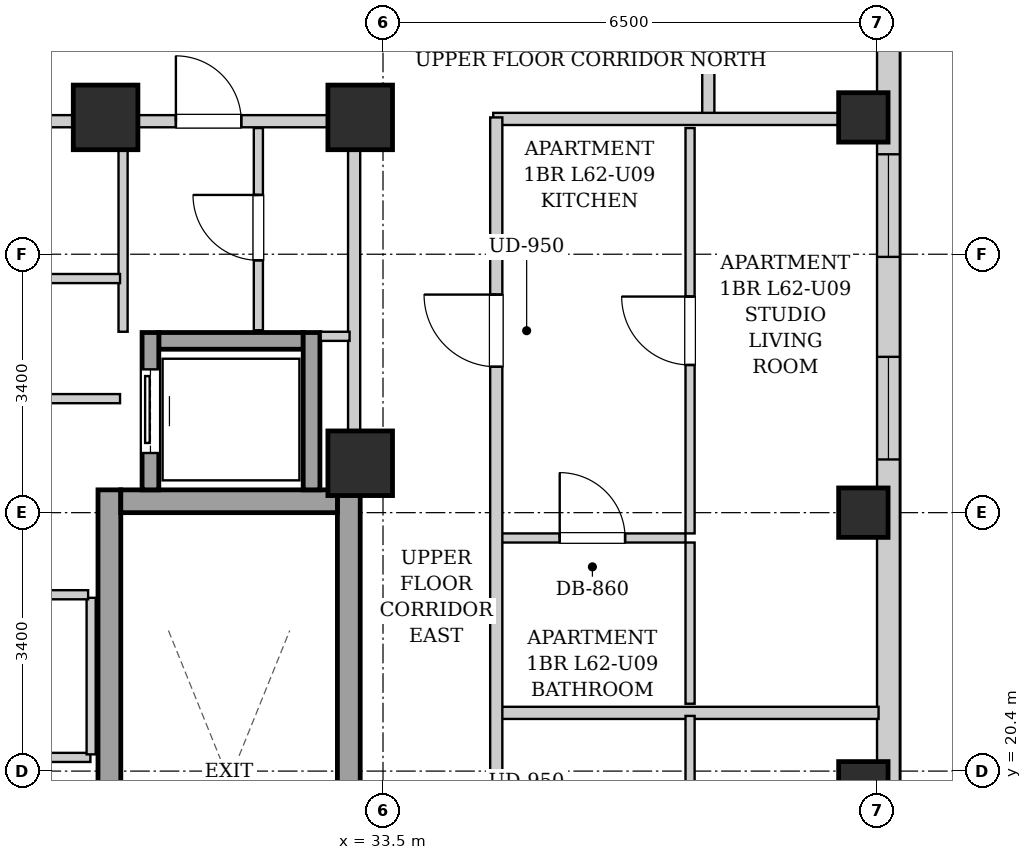
"""IFC4 building model, lengths in metres.
Left out: names, types, materials, properties, quantities, classifications, styles, units other than length and angle.
Written with IfcOpenShell. Run it as: python <this file> out.ifc"""

import sys

from ifc_helpers import new_model, si_unit, direction, frame, frame_2d, origin, origin_2d, place, context, subcontext, project, spatial, rectangle, extrude, element, fill, save


model = new_model("IFC4")
c1 = context("Model", 3, precision=1e-05, world=origin(), true_north=direction((0.0, 1.0)))
c2 = subcontext(c1, "Body", "Model", "MODEL_VIEW")
j1 = project(units=[si_unit("LENGTHUNIT", "METRE"), si_unit("PLANEANGLEUNIT", "RADIAN")], contexts=[c1])
p1 = place(None, origin())
s1 = spatial("IfcSite", under=j1, at=p1, CompositionType="ELEMENT")
p2 = place(p1, origin())
s2 = spatial("IfcBuilding", under=s1, at=p2, CompositionType="ELEMENT")
p3 = place(p2, frame((0.0, 0.0, 214.0)))
s3 = spatial("IfcBuildingStorey", under=s2, at=p3, CompositionType="ELEMENT", Elevation=214.0)
for number, where, z_axis, x_axis in (
    (1, (39.82, 20.2, 0.0), (0.0, 0.0, 1.0), (1.0, 0.0, 0.0)),
    (2, (39.82, 23.8, 0.0), (0.0, 0.0, 1.0), (1.0, 0.0, 0.0)),
    (3, (39.82, 29.0, 0.0), (0.0, 0.0, 1.0), (1.0, 0.0, 0.0)),
):
    element("IfcColumn", number, at=place(p3, frame(where, z_axis=z_axis, x_axis=x_axis)), inside=s3, PredefinedType="COLUMN", context=c2, shape_type="SweptSolid", body=[
        extrude(rectangle(XDim=0.65, YDim=0.65, at=origin_2d()), origin(), (0.0, 0.0, 1.0), 3.3),
    ])
for number, where, z_axis, x_axis in (
    (4, (29.85, 29.0, 0.0), (0.0, 0.0, 1.0), (1.0, 0.0, 0.0)),
    (5, (33.2, 29.0, 0.0), (0.0, 0.0, 1.0), (1.0, 0.0, 0.0)),
    (6, (33.2, 24.45, 0.0), (0.0, 0.0, 1.0), (1.0, 0.0, 0.0)),
):
    element("IfcColumn", number, at=place(p3, frame(where, z_axis=z_axis, x_axis=x_axis)), inside=s3, PredefinedType="COLUMN", context=c2, shape_type="SweptSolid", body=[
        extrude(rectangle(XDim=0.85, YDim=0.85, at=origin_2d()), origin(), (0.0, 0.0, 1.0), 3.3),
    ])
p4 = place(p3, frame((40.15, 37.7, 0.0), z_axis=(0.0, 0.0, 1.0), x_axis=(0.0, -1.0, 0.0)))
e7 = element("IfcWall", 7, at=p4, inside=s3, PredefinedType="SOLIDWALL", context=c2, shape_type="SweptSolid", body=[
    extrude(rectangle(XDim=31.4, YDim=0.3, at=frame_2d((15.7, 0.0))), origin(), (0.0, 0.0, 1.0), 3.04),
])
p5 = place(p4, frame((28.396, 0.0, 0.55)))
e8 = element("IfcOpeningElement", 8, at=p5, cuts=e7, PredefinedType="OPENING", context=c2, shape_type="SweptSolid", body=[
    extrude(rectangle(XDim=1.35, YDim=1.2, at=frame_2d((0.675, 0.6))), frame((0.0, 0.16, 0.0), z_axis=(0.0, -1.0, 0.0), x_axis=(1.0, 0.0, 0.0)), (0.0, 0.0, 1.0), 0.32),
])
p6 = place(p4, frame((1.653, 0.0, 0.55)))
e9 = element("IfcOpeningElement", 9, at=p6, cuts=e7, PredefinedType="OPENING", context=c2, shape_type="SweptSolid", body=[
    extrude(rectangle(XDim=1.35, YDim=1.2, at=frame_2d((0.675, 0.6))), frame((0.0, 0.16, 0.0), z_axis=(0.0, -1.0, 0.0), x_axis=(1.0, 0.0, 0.0)), (0.0, 0.0, 1.0), 0.32),
])
p7 = place(p4, frame((18.856, 0.0, 0.55)))
e10 = element("IfcOpeningElement", 10, at=p7, cuts=e7, PredefinedType="OPENING", context=c2, shape_type="SweptSolid", body=[
    extrude(rectangle(XDim=1.35, YDim=1.2, at=frame_2d((0.675, 0.6))), frame((0.0, 0.16, 0.0), z_axis=(0.0, -1.0, 0.0), x_axis=(1.0, 0.0, 0.0)), (0.0, 0.0, 1.0), 0.32),
])
p8 = place(p4, frame((20.466, 0.0, 0.55)))
e11 = element("IfcOpeningElement", 11, at=p8, cuts=e7, PredefinedType="OPENING", context=c2, shape_type="SweptSolid", body=[
    extrude(rectangle(XDim=1.35, YDim=1.2, at=frame_2d((0.675, 0.6))), frame((0.0, 0.16, 0.0), z_axis=(0.0, -1.0, 0.0), x_axis=(1.0, 0.0, 0.0)), (0.0, 0.0, 1.0), 0.32),
])
p9 = place(p4, frame((11.85, 0.0, 0.55)))
e12 = element("IfcOpeningElement", 12, at=p9, cuts=e7, PredefinedType="OPENING", context=c2, shape_type="SweptSolid", body=[
    extrude(rectangle(XDim=1.35, YDim=1.2, at=frame_2d((0.675, 0.6))), frame((0.0, 0.16, 0.0), z_axis=(0.0, -1.0, 0.0), x_axis=(1.0, 0.0, 0.0)), (0.0, 0.0, 1.0), 0.32),
])
p10 = place(p4, frame((9.185, 0.0, 0.55)))
e13 = element("IfcOpeningElement", 13, at=p10, cuts=e7, PredefinedType="OPENING", context=c2, shape_type="SweptSolid", body=[
    extrude(rectangle(XDim=1.35, YDim=1.2, at=frame_2d((0.675, 0.6))), frame((0.0, 0.16, 0.0), z_axis=(0.0, -1.0, 0.0), x_axis=(1.0, 0.0, 0.0)), (0.0, 0.0, 1.0), 0.32),
])
for number, where, z_axis, x_axis in (
    (14, (29.9, 15.1, 0.0), (0.0, 0.0, 1.0), (0.0, 1.0, 0.0)),
    (15, (33.05, 15.1, 0.0), (0.0, 0.0, 1.0), (0.0, 1.0, 0.0)),
):
    element("IfcWall", number, at=place(p3, frame(where, z_axis=z_axis, x_axis=x_axis)), inside=s3, PredefinedType="SHEAR", context=c2, shape_type="SweptSolid", body=[
        extrude(rectangle(XDim=9.0, YDim=0.3, at=frame_2d((4.5, 0.0))), origin(), (0.0, 0.0, 1.0), 3.04),
    ])
p11 = place(p3, frame((30.05, 23.95, 0.0), z_axis=(0.0, 0.0, 1.0), x_axis=(1.0, 0.0, 0.0)))
e16 = element("IfcWall", 16, at=p11, inside=s3, PredefinedType="SHEAR", context=c2, shape_type="SweptSolid", body=[
    extrude(rectangle(XDim=2.85, YDim=0.3, at=frame_2d((1.425, 0.0))), origin(), (0.0, 0.0, 1.0), 3.04),
])
p12 = place(p3, frame((30.55, 26.06, 0.0), z_axis=(0.0, 0.0, 1.0), x_axis=(1.0, 0.0, 0.0)))
e17 = element("IfcWall", 17, at=p12, inside=s3, PredefinedType="SHEAR", context=c2, shape_type="SweptSolid", body=[
    extrude(rectangle(XDim=1.9, YDim=0.22, at=frame_2d((0.95, 0.0))), origin(), (0.0, 0.0, 1.0), 3.04),
])
p13 = place(p3, frame((30.44, 24.1, 0.0), z_axis=(0.0, 0.0, 1.0), x_axis=(0.0, 1.0, 0.0)))
e18 = element("IfcWall", 18, at=p13, inside=s3, PredefinedType="SHEAR", context=c2, shape_type="SweptSolid", body=[
    extrude(rectangle(XDim=2.07, YDim=0.22, at=frame_2d((1.035, 0.0))), origin(), (0.0, 0.0, 1.0), 3.04),
])
p14 = place(p13, frame((0.485, 0.0, 0.0)))
e19 = element("IfcOpeningElement", 19, at=p14, cuts=e18, PredefinedType="OPENING", context=c2, shape_type="SweptSolid", body=[
    extrude(rectangle(XDim=1.1, YDim=2.15, at=frame_2d((0.55, 1.075))), frame((0.0, 0.12, 0.0), z_axis=(0.0, -1.0, 0.0), x_axis=(1.0, 0.0, 0.0)), (0.0, 0.0, 1.0), 0.24),
])
p15 = place(p3, frame((32.56, 24.1, 0.0), z_axis=(0.0, 0.0, 1.0), x_axis=(0.0, 1.0, 0.0)))
e20 = element("IfcWall", 20, at=p15, inside=s3, PredefinedType="SHEAR", context=c2, shape_type="SweptSolid", body=[
    extrude(rectangle(XDim=2.07, YDim=0.22, at=frame_2d((1.035, 0.0))), origin(), (0.0, 0.0, 1.0), 3.04),
])
p16 = place(p3, frame((33.12, 24.12, 0.0), z_axis=(0.0, 0.0, 1.0), x_axis=(0.0, 1.0, 0.0)))
e21 = element("IfcWall", 21, at=p16, inside=s3, PredefinedType="PARTITIONING", context=c2, shape_type="SweptSolid", body=[
    extrude(rectangle(XDim=4.76, YDim=0.16, at=frame_2d((2.38, 0.0))), origin(), (0.0, 0.0, 1.0), 3.04),
])
p17 = place(p3, frame((30.08, 26.18, 0.0), z_axis=(0.0, 0.0, 1.0), x_axis=(0.0, 1.0, 0.0)))
e22 = element("IfcWall", 22, at=p17, inside=s3, PredefinedType="PARTITIONING", context=c2, shape_type="SweptSolid", body=[
    extrude(rectangle(XDim=2.68, YDim=0.12, at=frame_2d((1.34, 0.0))), origin(), (0.0, 0.0, 1.0), 3.04),
])
p18 = place(p3, frame((32.68, 26.12, 0.0), z_axis=(0.0, 0.0, 1.0), x_axis=(1.0, 0.0, 0.0)))
e23 = element("IfcWall", 23, at=p18, inside=s3, PredefinedType="PARTITIONING", context=c2, shape_type="SweptSolid", body=[
    extrude(rectangle(XDim=0.38, YDim=0.12, at=frame_2d((0.19, 0.0))), origin(), (0.0, 0.0, 1.0), 3.04),
])
p19 = place(p3, frame((31.86, 26.2, 0.0), z_axis=(0.0, 0.0, 1.0), x_axis=(0.0, 1.0, 0.0)))
e24 = element("IfcWall", 24, at=p19, inside=s3, PredefinedType="PARTITIONING", context=c2, shape_type="SweptSolid", body=[
    extrude(rectangle(XDim=2.66, YDim=0.12, at=frame_2d((1.33, 0.0))), origin(), (0.0, 0.0, 1.0), 3.04),
])
p20 = place(p19, frame((0.92, 0.0, 0.0)))
e25 = element("IfcOpeningElement", 25, at=p20, cuts=e24, PredefinedType="OPENING", context=c2, shape_type="SweptSolid", body=[
    extrude(rectangle(XDim=0.86, YDim=2.05, at=frame_2d((0.43, 1.025))), frame((0.0, 0.07, 0.0), z_axis=(0.0, -1.0, 0.0), x_axis=(1.0, 0.0, 0.0)), (0.0, 0.0, 1.0), 0.14),
])
p21 = place(p3, frame((30.08, 28.95, 0.0), z_axis=(0.0, 0.0, 1.0), x_axis=(1.0, 0.0, 0.0)))
e26 = element("IfcWall", 26, at=p21, inside=s3, PredefinedType="PARTITIONING", context=c2, shape_type="SweptSolid", body=[
    extrude(rectangle(XDim=2.96, YDim=0.16, at=frame_2d((1.48, 0.0))), origin(), (0.0, 0.0, 1.0), 3.04),
])
p22 = place(p21, frame((0.695, 0.0, 0.0)))
e27 = element("IfcOpeningElement", 27, at=p22, cuts=e26, PredefinedType="OPENING", context=c2, shape_type="SweptSolid", body=[
    extrude(rectangle(XDim=0.86, YDim=2.05, at=frame_2d((0.43, 1.025))), frame((0.0, 0.09, 0.0), z_axis=(0.0, -1.0, 0.0), x_axis=(1.0, 0.0, 0.0)), (0.0, 0.0, 1.0), 0.18),
])
p23 = place(p3, frame((25.72, 26.88, 0.0), z_axis=(0.0, 0.0, 1.0), x_axis=(1.0, 0.0, 0.0)))
e28 = element("IfcWall", 28, at=p23, inside=s3, PredefinedType="PARTITIONING", context=c2, shape_type="SweptSolid", body=[
    extrude(rectangle(XDim=4.32, YDim=0.12, at=frame_2d((2.16, 0.0))), origin(), (0.0, 0.0, 1.0), 3.04),
])
p24 = place(p3, frame((25.72, 25.3, 0.0), z_axis=(0.0, 0.0, 1.0), x_axis=(1.0, 0.0, 0.0)))
e29 = element("IfcWall", 29, at=p24, inside=s3, PredefinedType="PARTITIONING", context=c2, shape_type="SweptSolid", body=[
    extrude(rectangle(XDim=4.32, YDim=0.12, at=frame_2d((2.16, 0.0))), origin(), (0.0, 0.0, 1.0), 3.04),
])
p25 = place(p24, frame((1.65, 0.0, 0.0)))
e30 = element("IfcOpeningElement", 30, at=p25, cuts=e29, PredefinedType="OPENING", context=c2, shape_type="SweptSolid", body=[
    extrude(rectangle(XDim=0.9, YDim=2.05, at=frame_2d((0.45, 1.025))), frame((0.0, 0.07, 0.0), z_axis=(0.0, -1.0, 0.0), x_axis=(1.0, 0.0, 0.0)), (0.0, 0.0, 1.0), 0.14),
])
p26 = place(p3, frame((25.72, 28.95, 0.0), z_axis=(0.0, 0.0, 1.0), x_axis=(1.0, 0.0, 0.0)))
e31 = element("IfcWall", 31, at=p26, inside=s3, PredefinedType="PARTITIONING", context=c2, shape_type="SweptSolid", body=[
    extrude(rectangle(XDim=4.32, YDim=0.16, at=frame_2d((2.16, 0.0))), origin(), (0.0, 0.0, 1.0), 2.556),
])
p27 = place(p26, frame((1.27, 0.0, 0.0)))
e32 = element("IfcOpeningElement", 32, at=p27, cuts=e31, PredefinedType="OPENING", context=c2, shape_type="SweptSolid", body=[
    extrude(rectangle(XDim=0.86, YDim=2.05, at=frame_2d((0.43, 1.025))), frame((0.0, 0.09, 0.0), z_axis=(0.0, -1.0, 0.0), x_axis=(1.0, 0.0, 0.0)), (0.0, 0.0, 1.0), 0.18),
])
p28 = place(p3, frame((22.3, 20.58, 0.0), z_axis=(0.0, 0.0, 1.0), x_axis=(1.0, 0.0, 0.0)))
e33 = element("IfcWall", 33, at=p28, inside=s3, PredefinedType="PARTITIONING", context=c2, shape_type="SweptSolid", body=[
    extrude(rectangle(XDim=7.35, YDim=0.12, at=frame_2d((3.675, 0.0))), origin(), (0.0, 0.0, 1.0), 3.04),
])
p29 = place(p3, frame((29.66, 20.62, 0.0), z_axis=(0.0, 0.0, 1.0), x_axis=(0.0, 1.0, 0.0)))
e34 = element("IfcWall", 34, at=p29, inside=s3, PredefinedType="PARTITIONING", context=c2, shape_type="SweptSolid", body=[
    extrude(rectangle(XDim=2.06, YDim=0.12, at=frame_2d((1.03, 0.0))), origin(), (0.0, 0.0, 1.0), 3.04),
])
p30 = place(p3, frame((22.35, 22.72, 0.0), z_axis=(0.0, 0.0, 1.0), x_axis=(1.0, 0.0, 0.0)))
e35 = element("IfcWall", 35, at=p30, inside=s3, PredefinedType="PARTITIONING", context=c2, shape_type="SweptSolid", body=[
    extrude(rectangle(XDim=7.27, YDim=0.12, at=frame_2d((3.635, 0.0))), origin(), (0.0, 0.0, 1.0), 3.04),
])
p31 = place(p30, frame((1.175, 0.0, 0.0)))
e36 = element("IfcOpeningElement", 36, at=p31, cuts=e35, PredefinedType="OPENING", context=c2, shape_type="SweptSolid", body=[
    extrude(rectangle(XDim=0.9, YDim=2.05, at=frame_2d((0.45, 1.025))), frame((0.0, 0.07, 0.0), z_axis=(0.0, -1.0, 0.0), x_axis=(1.0, 0.0, 0.0)), (0.0, 0.0, 1.0), 0.14),
])
p32 = place(p30, frame((4.725, 0.0, 0.0)))
e37 = element("IfcOpeningElement", 37, at=p32, cuts=e35, PredefinedType="OPENING", context=c2, shape_type="SweptSolid", body=[
    extrude(rectangle(XDim=0.9, YDim=2.05, at=frame_2d((0.45, 1.025))), frame((0.0, 0.07, 0.0), z_axis=(0.0, -1.0, 0.0), x_axis=(1.0, 0.0, 0.0)), (0.0, 0.0, 1.0), 0.14),
])
p33 = place(p3, frame((37.78, 28.98, 0.0), z_axis=(0.0, 0.0, 1.0), x_axis=(0.0, 1.0, 0.0)))
e38 = element("IfcWall", 38, at=p33, inside=s3, PredefinedType="PARTITIONING", context=c2, shape_type="SweptSolid", body=[
    extrude(rectangle(XDim=1.58, YDim=0.16, at=frame_2d((0.79, 0.0))), origin(), (0.0, 0.0, 1.0), 3.04),
])
p34 = place(p3, frame((34.95, 28.98, 0.0), z_axis=(0.0, 0.0, 1.0), x_axis=(1.0, 0.0, 0.0)))
e39 = element("IfcWall", 39, at=p34, inside=s3, PredefinedType="PARTITIONING", context=c2, shape_type="SweptSolid", body=[
    extrude(rectangle(XDim=5.07, YDim=0.16, at=frame_2d((2.535, 0.0))), origin(), (0.0, 0.0, 1.0), 2.556),
])
p35 = place(p3, frame((35.03, 21.166, 0.0), z_axis=(0.0, 0.0, 1.0), x_axis=(1.0, 0.0, 0.0)))
e40 = element("IfcWall", 40, at=p35, inside=s3, PredefinedType="PARTITIONING", context=c2, shape_type="SweptSolid", body=[
    extrude(rectangle(XDim=4.99, YDim=0.16, at=frame_2d((2.495, 0.0))), origin(), (0.0, 0.0, 1.0), 3.04),
])
p36 = place(p3, frame((37.54, 17.18, 0.0), z_axis=(0.0, 0.0, 1.0), x_axis=(0.0, 1.0, 0.0)))
e41 = element("IfcWall", 41, at=p36, inside=s3, PredefinedType="PARTITIONING", context=c2, shape_type="SweptSolid", body=[
    extrude(rectangle(XDim=3.946, YDim=0.12, at=frame_2d((1.973, 0.0))), origin(), (0.0, 0.0, 1.0), 3.04),
])
p37 = place(p36, frame((1.523, 0.0, 0.0)))
e42 = element("IfcOpeningElement", 42, at=p37, cuts=e41, PredefinedType="OPENING", context=c2, shape_type="SweptSolid", body=[
    extrude(rectangle(XDim=0.9, YDim=2.05, at=frame_2d((0.45, 1.025))), frame((0.0, 0.07, 0.0), z_axis=(0.0, -1.0, 0.0), x_axis=(1.0, 0.0, 0.0)), (0.0, 0.0, 1.0), 0.14),
])
p38 = place(p3, frame((35.03, 23.467, 0.0), z_axis=(0.0, 0.0, 1.0), x_axis=(1.0, 0.0, 0.0)))
e43 = element("IfcWall", 43, at=p38, inside=s3, PredefinedType="PARTITIONING", context=c2, shape_type="SweptSolid", body=[
    extrude(rectangle(XDim=2.45, YDim=0.12, at=frame_2d((1.225, 0.0))), origin(), (0.0, 0.0, 1.0), 3.04),
])
p39 = place(p38, frame((0.795, 0.0, 0.0)))
e44 = element("IfcOpeningElement", 44, at=p39, cuts=e43, PredefinedType="OPENING", context=c2, shape_type="SweptSolid", body=[
    extrude(rectangle(XDim=0.86, YDim=2.05, at=frame_2d((0.43, 1.025))), frame((0.0, 0.07, 0.0), z_axis=(0.0, -1.0, 0.0), x_axis=(1.0, 0.0, 0.0)), (0.0, 0.0, 1.0), 0.14),
])
p40 = place(p3, frame((37.54, 21.286, 0.0), z_axis=(0.0, 0.0, 1.0), x_axis=(0.0, 1.0, 0.0)))
e45 = element("IfcWall", 45, at=p40, inside=s3, PredefinedType="PARTITIONING", context=c2, shape_type="SweptSolid", body=[
    extrude(rectangle(XDim=2.121, YDim=0.12, at=frame_2d((1.061, 0.0))), origin(), (0.0, 0.0, 1.0), 3.04),
])
p41 = place(p3, frame((37.54, 23.527, 0.0), z_axis=(0.0, 0.0, 1.0), x_axis=(0.0, 1.0, 0.0)))
e46 = element("IfcWall", 46, at=p41, inside=s3, PredefinedType="PARTITIONING", context=c2, shape_type="SweptSolid", body=[
    extrude(rectangle(XDim=5.333, YDim=0.12, at=frame_2d((2.667, 0.0))), origin(), (0.0, 0.0, 1.0), 3.04),
])
p42 = place(p41, frame((2.216, 0.0, 0.0)))
e47 = element("IfcOpeningElement", 47, at=p42, cuts=e46, PredefinedType="OPENING", context=c2, shape_type="SweptSolid", body=[
    extrude(rectangle(XDim=0.9, YDim=2.05, at=frame_2d((0.45, 1.025))), frame((0.0, 0.07, 0.0), z_axis=(0.0, -1.0, 0.0), x_axis=(1.0, 0.0, 0.0)), (0.0, 0.0, 1.0), 0.14),
])
p43 = place(p3, frame((34.99, 15.07, 0.0), z_axis=(0.0, 0.0, 1.0), x_axis=(0.0, 1.0, 0.0)))
e48 = element("IfcWall", 48, at=p43, inside=s3, PredefinedType="PARTITIONING", context=c2, shape_type="SweptSolid", body=[
    extrude(rectangle(XDim=13.93, YDim=0.16, at=frame_2d((6.965, 0.0))), origin(), (0.0, 0.0, 1.0), 3.04),
])
p44 = place(p43, frame((3.608, 0.0, 0.0)))
e49 = element("IfcOpeningElement", 49, at=p44, cuts=e48, PredefinedType="OPENING", context=c2, shape_type="SweptSolid", body=[
    extrude(rectangle(XDim=0.95, YDim=2.1, at=frame_2d((0.475, 1.05))), frame((0.0, 0.09, 0.0), z_axis=(0.0, -1.0, 0.0), x_axis=(1.0, 0.0, 0.0)), (0.0, 0.0, 1.0), 0.18),
])
p45 = place(p43, frame((10.649, 0.0, 0.0)))
e50 = element("IfcOpeningElement", 50, at=p45, cuts=e48, PredefinedType="OPENING", context=c2, shape_type="SweptSolid", body=[
    extrude(rectangle(XDim=0.95, YDim=2.1, at=frame_2d((0.475, 1.05))), frame((0.0, 0.09, 0.0), z_axis=(0.0, -1.0, 0.0), x_axis=(1.0, 0.0, 0.0)), (0.0, 0.0, 1.0), 0.18),
])
p46 = place(p14, origin())
e51 = element("IfcDoor", 51, at=p46, inside=s3, OperationType="SLIDING_TO_LEFT", PredefinedType="DOOR", context=c2, shape_type="SweptSolid", body=[
    extrude(rectangle(XDim=1.1, YDim=2.15, at=frame_2d((0.55, 1.075))), frame((0.0, 0.025, 0.0), z_axis=(0.0, -1.0, 0.0), x_axis=(1.0, 0.0, 0.0)), (0.0, 0.0, 1.0), 0.05),
])
fill(e19, e51)
p47 = place(p20, origin())
e52 = element("IfcDoor", 52, at=p47, inside=s3, OperationType="SINGLE_SWING_RIGHT", PredefinedType="DOOR", context=c2, shape_type="SweptSolid", body=[
    extrude(rectangle(XDim=0.86, YDim=2.05, at=frame_2d((0.43, 1.025))), frame((0.0, 0.025, 0.0), z_axis=(0.0, -1.0, 0.0), x_axis=(1.0, 0.0, 0.0)), (0.0, 0.0, 1.0), 0.05),
])
fill(e25, e52)
p48 = place(p22, origin())
e53 = element("IfcDoor", 53, at=p48, inside=s3, OperationType="SINGLE_SWING_LEFT", PredefinedType="DOOR", context=c2, shape_type="SweptSolid", body=[
    extrude(rectangle(XDim=0.86, YDim=2.05, at=frame_2d((0.43, 1.025))), frame((0.0, 0.025, 0.0), z_axis=(0.0, -1.0, 0.0), x_axis=(1.0, 0.0, 0.0)), (0.0, 0.0, 1.0), 0.05),
])
fill(e27, e53)
p49 = place(p39, origin())
e54 = element("IfcDoor", 54, at=p49, inside=s3, OperationType="SINGLE_SWING_LEFT", PredefinedType="DOOR", context=c2, shape_type="SweptSolid", body=[
    extrude(rectangle(XDim=0.86, YDim=2.05, at=frame_2d((0.43, 1.025))), frame((0.0, 0.025, 0.0), z_axis=(0.0, -1.0, 0.0), x_axis=(1.0, 0.0, 0.0)), (0.0, 0.0, 1.0), 0.05),
])
fill(e44, e54)
p50 = place(p42, origin())
e55 = element("IfcDoor", 55, at=p50, inside=s3, OperationType="SINGLE_SWING_RIGHT", PredefinedType="DOOR", context=c2, shape_type="SweptSolid", body=[
    extrude(rectangle(XDim=0.9, YDim=2.05, at=frame_2d((0.45, 1.025))), frame((0.0, 0.025, 0.0), z_axis=(0.0, -1.0, 0.0), x_axis=(1.0, 0.0, 0.0)), (0.0, 0.0, 1.0), 0.05),
])
fill(e47, e55)
p51 = place(p45, origin())
e56 = element("IfcDoor", 56, at=p51, inside=s3, OperationType="SINGLE_SWING_RIGHT", PredefinedType="DOOR", context=c2, shape_type="SweptSolid", body=[
    extrude(rectangle(XDim=0.95, YDim=2.1, at=frame_2d((0.475, 1.05))), frame((0.0, 0.025, 0.0), z_axis=(0.0, -1.0, 0.0), x_axis=(1.0, 0.0, 0.0)), (0.0, 0.0, 1.0), 0.05),
])
fill(e50, e56)
p52 = place(p9, origin())
e57 = element("IfcWindow", 57, at=p52, inside=s3, PartitioningType="SINGLE_PANEL", PredefinedType="WINDOW", context=c2, shape_type="SweptSolid", body=[
    extrude(rectangle(XDim=1.35, YDim=1.2, at=frame_2d((0.675, 0.6))), frame((0.0, 0.03, 0.0), z_axis=(0.0, -1.0, 0.0), x_axis=(1.0, 0.0, 0.0)), (0.0, 0.0, 1.0), 0.06),
])
fill(e12, e57)
p53 = place(p10, origin())
e58 = element("IfcWindow", 58, at=p53, inside=s3, PartitioningType="SINGLE_PANEL", PredefinedType="WINDOW", context=c2, shape_type="SweptSolid", body=[
    extrude(rectangle(XDim=1.35, YDim=1.2, at=frame_2d((0.675, 0.6))), frame((0.0, 0.03, 0.0), z_axis=(0.0, -1.0, 0.0), x_axis=(1.0, 0.0, 0.0)), (0.0, 0.0, 1.0), 0.06),
])
fill(e13, e58)
save(model, sys.argv[1])
